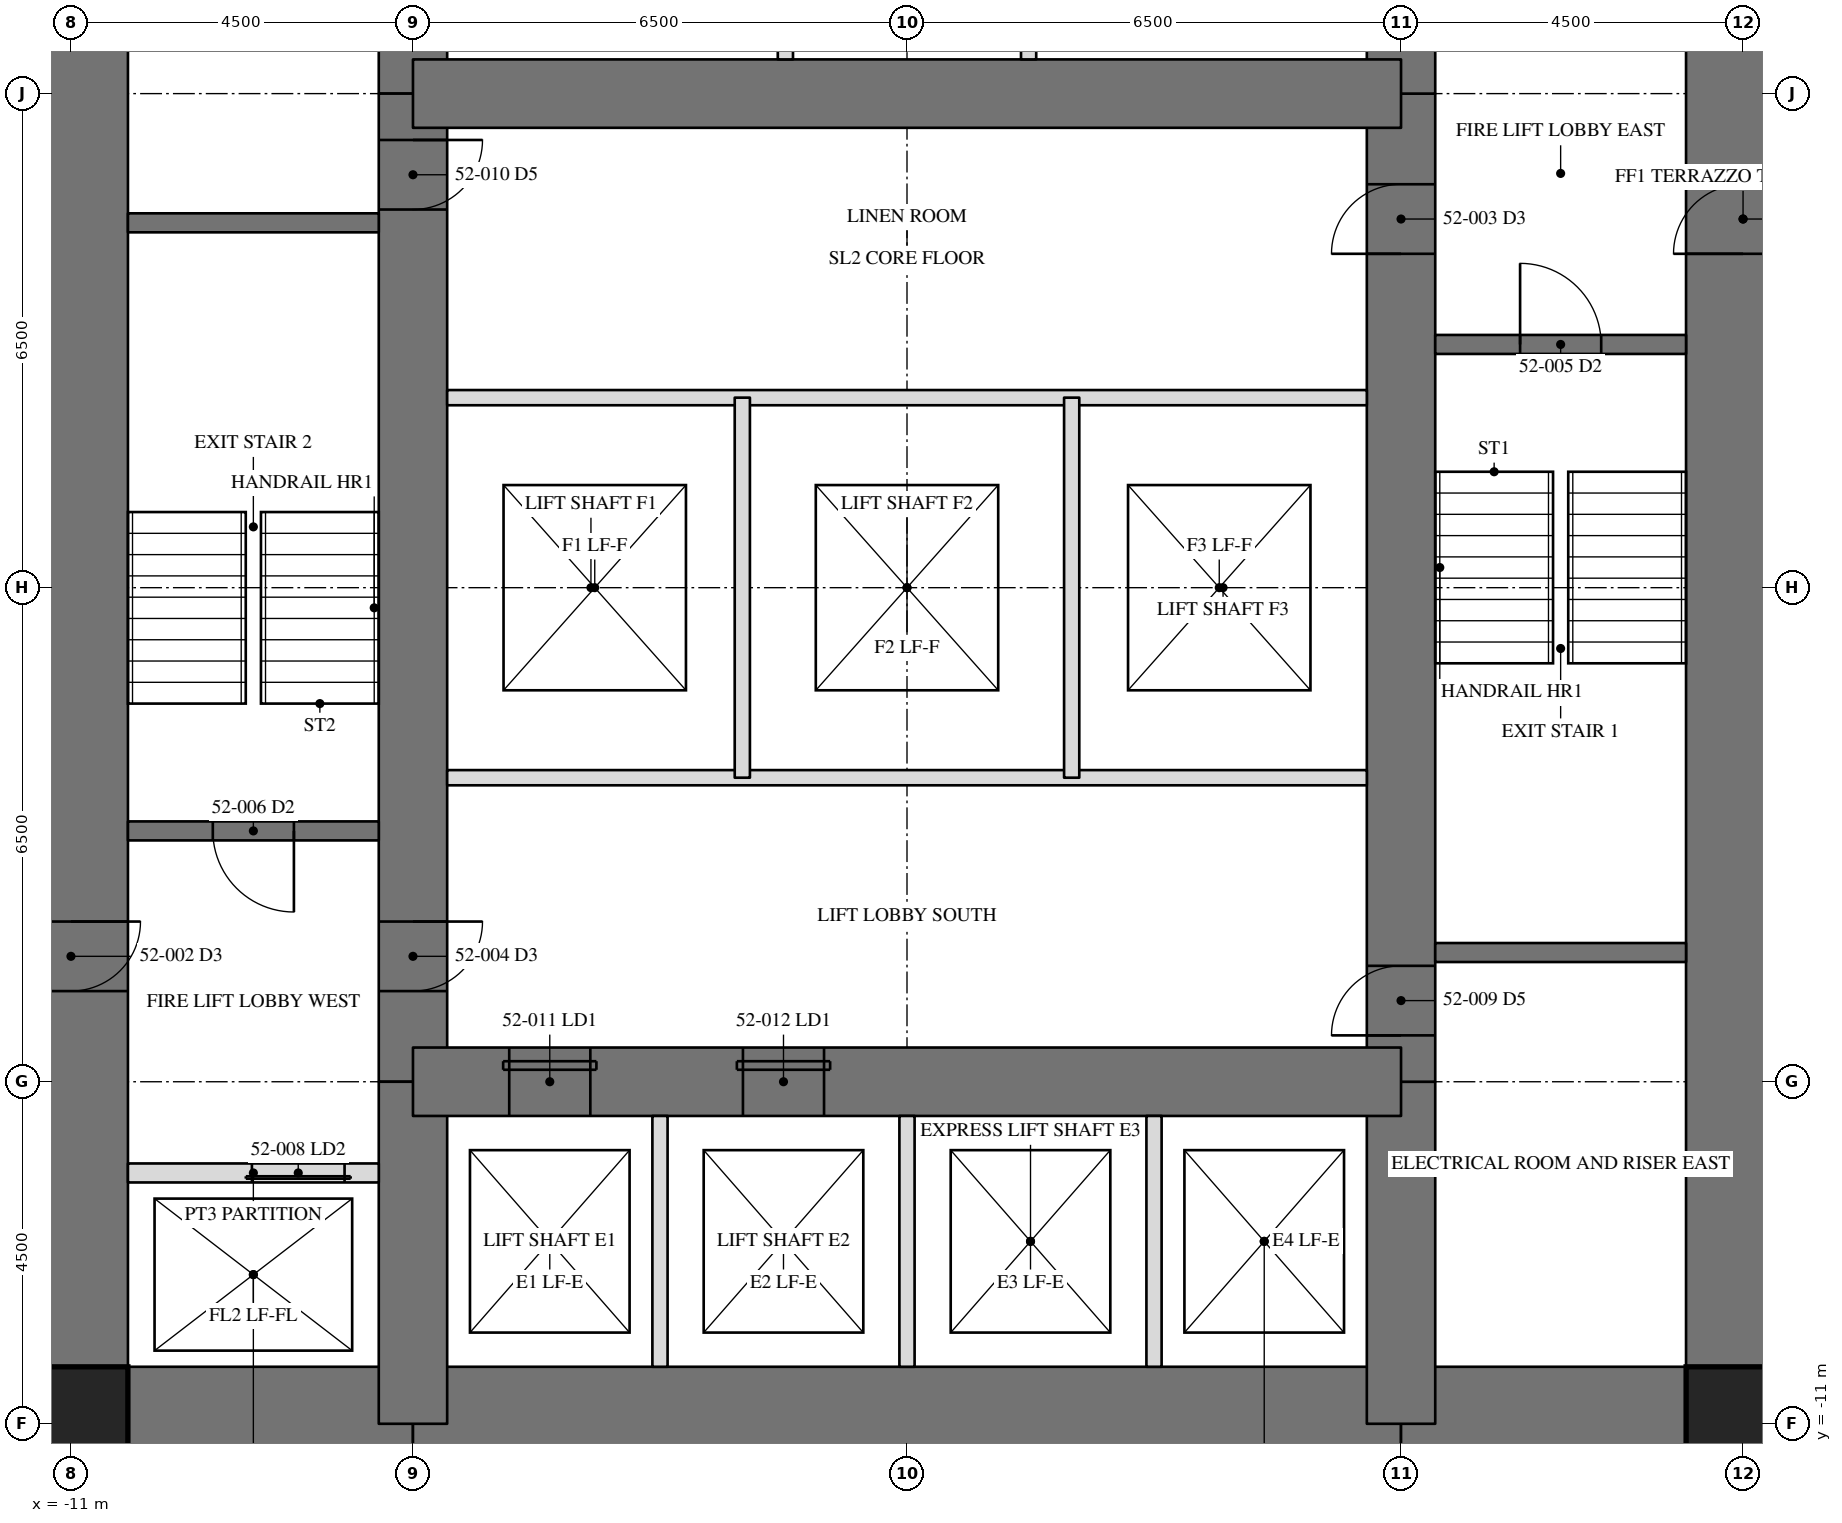
"""IFC4 building model, lengths in metres.
Left out: names, types, materials, properties, quantities, classifications, styles, units other than length and angle.
Written with IfcOpenShell. Run it as: python <this file> out.ifc"""

import sys

from ifc_helpers import new_model, si_unit, direction, frame, frame_2d, origin, origin_2d, place, context, subcontext, project, spatial, rectangle, hollow_rectangle, extrude, element, fill, save


model = new_model("IFC4")
c1 = context("Model", 3, precision=1e-05, world=origin(), true_north=direction((0.0, 1.0)))
c2 = subcontext(c1, "Body", "Model", "MODEL_VIEW")
j1 = project(units=[si_unit("LENGTHUNIT", "METRE"), si_unit("PLANEANGLEUNIT", "RADIAN")], contexts=[c1])
p1 = place(None, origin())
s1 = spatial("IfcSite", under=j1, at=p1, CompositionType="ELEMENT")
p2 = place(p1, origin())
s2 = spatial("IfcBuilding", under=s1, at=p2, CompositionType="ELEMENT")
p3 = place(p2, frame((0.0, 0.0, 218.7)))
s3 = spatial("IfcBuildingStorey", under=s2, at=p3, CompositionType="ELEMENT", Elevation=218.7)
p4 = place(p3, frame((11.0, -11.0, 0.0), z_axis=(0.0, 0.0, 1.0), x_axis=(0.0, 1.0, 0.0)))
e1 = element("IfcWall", 1, at=p4, inside=s3, PredefinedType="SHEAR", context=c2, shape_type="SweptSolid", body=[
    extrude(rectangle(XDim=22.0, YDim=1.5, at=frame_2d((11.0, 0.0))), origin(), (0.0, 0.0, 1.0), 3.5),
])
p5 = place(p4, frame((15.393, 0.0, 0.0)))
e2 = element("IfcOpeningElement", 2, at=p5, cuts=e1, PredefinedType="OPENING", context=c2, shape_type="SweptSolid", body=[
    extrude(rectangle(XDim=0.915, YDim=2.134, at=frame_2d((0.458, 1.067))), frame((0.0, 0.76, 0.0), z_axis=(0.0, -1.0, 0.0), x_axis=(1.0, 0.0, 0.0)), (0.0, 0.0, 1.0), 1.52),
])
p6 = place(p3, frame((-11.0, 11.0, 0.0), z_axis=(0.0, 0.0, 1.0), x_axis=(0.0, -1.0, 0.0)))
e3 = element("IfcWall", 3, at=p6, inside=s3, PredefinedType="SHEAR", context=c2, shape_type="SweptSolid", body=[
    extrude(rectangle(XDim=22.0, YDim=1.5, at=frame_2d((11.0, 0.0))), origin(), (0.0, 0.0, 1.0), 3.5),
])
p7 = place(p6, frame((15.393, 0.0, 0.0)))
e4 = element("IfcOpeningElement", 4, at=p7, cuts=e3, PredefinedType="OPENING", context=c2, shape_type="SweptSolid", body=[
    extrude(rectangle(XDim=0.915, YDim=2.134, at=frame_2d((0.458, 1.067))), frame((0.0, 0.76, 0.0), z_axis=(0.0, -1.0, 0.0), x_axis=(1.0, 0.0, 0.0)), (0.0, 0.0, 1.0), 1.52),
])
p8 = place(p3, frame((-11.0, -11.0, 0.0), z_axis=(0.0, 0.0, 1.0), x_axis=(1.0, 0.0, 0.0)))
e5 = element("IfcWall", 5, at=p8, inside=s3, PredefinedType="SHEAR", context=c2, shape_type="SweptSolid", body=[
    extrude(rectangle(XDim=4.5, YDim=1.5, at=frame_2d((2.25, 0.0))), origin(), (0.0, 0.0, 1.0), 3.5),
])
p9 = place(p3, frame((-6.5, -11.0, 0.0), z_axis=(0.0, 0.0, 1.0), x_axis=(1.0, 0.0, 0.0)))
e6 = element("IfcWall", 6, at=p9, inside=s3, PredefinedType="SHEAR", context=c2, shape_type="SweptSolid", body=[
    extrude(rectangle(XDim=13.0, YDim=1.5, at=frame_2d((6.5, 0.0))), origin(), (0.0, 0.0, 1.0), 3.5),
])
p10 = place(p3, frame((6.5, -11.0, 0.0), z_axis=(0.0, 0.0, 1.0), x_axis=(1.0, 0.0, 0.0)))
e7 = element("IfcWall", 7, at=p10, inside=s3, PredefinedType="SHEAR", context=c2, shape_type="SweptSolid", body=[
    extrude(rectangle(XDim=4.5, YDim=1.5, at=frame_2d((2.25, 0.0))), origin(), (0.0, 0.0, 1.0), 3.5),
])
p11 = place(p3, frame((6.5, -11.0, 0.0), z_axis=(0.0, 0.0, 1.0), x_axis=(0.0, 1.0, 0.0)))
e8 = element("IfcWall", 8, at=p11, inside=s3, PredefinedType="SHEAR", context=c2, shape_type="SweptSolid", body=[
    extrude(rectangle(XDim=4.5, YDim=0.9, at=frame_2d((2.25, 0.0))), origin(), (0.0, 0.0, 1.0), 3.5),
])
p12 = place(p3, frame((6.5, -6.5, 0.0), z_axis=(0.0, 0.0, 1.0), x_axis=(0.0, 1.0, 0.0)))
e9 = element("IfcWall", 9, at=p12, inside=s3, PredefinedType="SHEAR", context=c2, shape_type="SweptSolid", body=[
    extrude(rectangle(XDim=13.0, YDim=0.9, at=frame_2d((6.5, 0.0))), origin(), (0.0, 0.0, 1.0), 3.5),
])
p13 = place(p12, frame((10.893, 0.0, 0.0)))
e10 = element("IfcOpeningElement", 10, at=p13, cuts=e9, PredefinedType="OPENING", context=c2, shape_type="SweptSolid", body=[
    extrude(rectangle(XDim=0.915, YDim=2.134, at=frame_2d((0.458, 1.067))), frame((0.0, 0.46, 0.0), z_axis=(0.0, -1.0, 0.0), x_axis=(1.0, 0.0, 0.0)), (0.0, 0.0, 1.0), 0.92),
])
p14 = place(p12, frame((0.61, 0.0, 0.0)))
e11 = element("IfcOpeningElement", 11, at=p14, cuts=e9, PredefinedType="OPENING", context=c2, shape_type="SweptSolid", body=[
    extrude(rectangle(XDim=0.915, YDim=2.134, at=frame_2d((0.458, 1.067))), frame((0.0, 0.46, 0.0), z_axis=(0.0, -1.0, 0.0), x_axis=(1.0, 0.0, 0.0)), (0.0, 0.0, 1.0), 0.92),
])
for number, where, z_axis, x_axis in (
    (12, (6.5, 6.5, 0.0), (0.0, 0.0, 1.0), (0.0, 1.0, 0.0)),
    (13, (-6.5, 11.0, 0.0), (0.0, 0.0, 1.0), (0.0, -1.0, 0.0)),
):
    element("IfcWall", number, at=place(p3, frame(where, z_axis=z_axis, x_axis=x_axis)), inside=s3, PredefinedType="SHEAR", context=c2, shape_type="SweptSolid", body=[
        extrude(rectangle(XDim=4.5, YDim=0.9, at=frame_2d((2.25, 0.0))), origin(), (0.0, 0.0, 1.0), 3.5),
    ])
p15 = place(p3, frame((-6.5, 6.5, 0.0), z_axis=(0.0, 0.0, 1.0), x_axis=(0.0, -1.0, 0.0)))
e14 = element("IfcWall", 14, at=p15, inside=s3, PredefinedType="SHEAR", context=c2, shape_type="SweptSolid", body=[
    extrude(rectangle(XDim=13.0, YDim=0.9, at=frame_2d((6.5, 0.0))), origin(), (0.0, 0.0, 1.0), 3.5),
])
p16 = place(p15, frame((10.893, 0.0, 0.0)))
e15 = element("IfcOpeningElement", 15, at=p16, cuts=e14, PredefinedType="OPENING", context=c2, shape_type="SweptSolid", body=[
    extrude(rectangle(XDim=0.915, YDim=2.134, at=frame_2d((0.458, 1.067))), frame((0.0, 0.46, 0.0), z_axis=(0.0, -1.0, 0.0), x_axis=(1.0, 0.0, 0.0)), (0.0, 0.0, 1.0), 0.92),
])
p17 = place(p15, frame((0.61, 0.0, 0.0)))
e16 = element("IfcOpeningElement", 16, at=p17, cuts=e14, PredefinedType="OPENING", context=c2, shape_type="SweptSolid", body=[
    extrude(rectangle(XDim=0.915, YDim=2.134, at=frame_2d((0.458, 1.067))), frame((0.0, 0.46, 0.0), z_axis=(0.0, -1.0, 0.0), x_axis=(1.0, 0.0, 0.0)), (0.0, 0.0, 1.0), 0.92),
])
p18 = place(p3, frame((-6.5, -6.5, 0.0), z_axis=(0.0, 0.0, 1.0), x_axis=(0.0, -1.0, 0.0)))
e17 = element("IfcWall", 17, at=p18, inside=s3, PredefinedType="SHEAR", context=c2, shape_type="SweptSolid", body=[
    extrude(rectangle(XDim=4.5, YDim=0.9, at=frame_2d((2.25, 0.0))), origin(), (0.0, 0.0, 1.0), 3.5),
])
p19 = place(p3, frame((6.5, 6.5, 0.0), z_axis=(0.0, 0.0, 1.0), x_axis=(-1.0, 0.0, 0.0)))
e18 = element("IfcWall", 18, at=p19, inside=s3, PredefinedType="SHEAR", context=c2, shape_type="SweptSolid", body=[
    extrude(rectangle(XDim=13.0, YDim=0.9, at=frame_2d((6.5, 0.0))), origin(), (0.0, 0.0, 1.0), 3.5),
])
p20 = place(p3, frame((-6.5, -6.5, 0.0), z_axis=(0.0, 0.0, 1.0), x_axis=(1.0, 0.0, 0.0)))
e19 = element("IfcWall", 19, at=p20, inside=s3, PredefinedType="SHEAR", context=c2, shape_type="SweptSolid", body=[
    extrude(rectangle(XDim=13.0, YDim=0.9, at=frame_2d((6.5, 0.0))), origin(), (0.0, 0.0, 1.0), 3.5),
])
p21 = place(p20, frame((1.267, 0.0, 0.0)))
e20 = element("IfcOpeningElement", 20, at=p21, cuts=e19, PredefinedType="OPENING", context=c2, shape_type="SweptSolid", body=[
    extrude(rectangle(XDim=1.067, YDim=2.134, at=frame_2d((0.533, 1.067))), frame((0.0, 0.46, 0.0), z_axis=(0.0, -1.0, 0.0), x_axis=(1.0, 0.0, 0.0)), (0.0, 0.0, 1.0), 0.92),
])
p22 = place(p20, frame((4.342, 0.0, 0.0)))
e21 = element("IfcOpeningElement", 21, at=p22, cuts=e19, PredefinedType="OPENING", context=c2, shape_type="SweptSolid", body=[
    extrude(rectangle(XDim=1.067, YDim=2.134, at=frame_2d((0.533, 1.067))), frame((0.0, 0.46, 0.0), z_axis=(0.0, -1.0, 0.0), x_axis=(1.0, 0.0, 0.0)), (0.0, 0.0, 1.0), 0.92),
])
for number, where, z_axis, x_axis in (
    (22, (-11.0, -11.0, 0.0), (0.0, 0.0, 1.0), (1.0, 0.0, 0.0)),
    (23, (11.0, -11.0, 0.0), (0.0, 0.0, 1.0), (1.0, 0.0, 0.0)),
):
    element("IfcColumn", number, at=place(p3, frame(where, z_axis=z_axis, x_axis=x_axis)), inside=s3, PredefinedType="COLUMN", context=c2, shape_type="SweptSolid", body=[
        extrude(hollow_rectangle(XDim=1.499, YDim=1.499, WallThickness=0.102, at=origin_2d()), origin(), (0.0, 0.0, 1.0), 3.5),
    ])
for number, where, z_axis, x_axis in (
    (24, (6.95, -4.8, 0.0), (0.0, 0.0, 1.0), (1.0, 0.0, 0.0)),
    (25, (-6.95, 4.8, 0.0), (0.0, 0.0, 1.0), (-1.0, 0.0, 0.0)),
):
    element("IfcWall", number, at=place(p3, frame(where, z_axis=z_axis, x_axis=x_axis)), inside=s3, PredefinedType="SOLIDWALL", context=c2, shape_type="SweptSolid", body=[
        extrude(rectangle(XDim=3.3, YDim=0.25, at=frame_2d((1.65, 0.0))), origin(), (0.0, 0.0, 1.0), 3.31),
    ])
p23 = place(p3, frame((6.95, 3.2, 0.0), z_axis=(0.0, 0.0, 1.0), x_axis=(1.0, 0.0, 0.0)))
e26 = element("IfcWall", 26, at=p23, inside=s3, PredefinedType="SOLIDWALL", context=c2, shape_type="SweptSolid", body=[
    extrude(rectangle(XDim=3.3, YDim=0.25, at=frame_2d((1.65, 0.0))), origin(), (0.0, 0.0, 1.0), 3.31),
])
p24 = place(p23, frame((1.116, 0.0, 0.0)))
e27 = element("IfcOpeningElement", 27, at=p24, cuts=e26, PredefinedType="OPENING", context=c2, shape_type="SweptSolid", body=[
    extrude(rectangle(XDim=1.067, YDim=2.134, at=frame_2d((0.533, 1.067))), frame((0.0, 0.135, 0.0), z_axis=(0.0, -1.0, 0.0), x_axis=(1.0, 0.0, 0.0)), (0.0, 0.0, 1.0), 0.27),
])
p25 = place(p3, frame((-6.95, -3.2, 0.0), z_axis=(0.0, 0.0, 1.0), x_axis=(-1.0, 0.0, 0.0)))
e28 = element("IfcWall", 28, at=p25, inside=s3, PredefinedType="SOLIDWALL", context=c2, shape_type="SweptSolid", body=[
    extrude(rectangle(XDim=3.3, YDim=0.25, at=frame_2d((1.65, 0.0))), origin(), (0.0, 0.0, 1.0), 3.31),
])
p26 = place(p25, frame((1.116, 0.0, 0.0)))
e29 = element("IfcOpeningElement", 29, at=p26, cuts=e28, PredefinedType="OPENING", context=c2, shape_type="SweptSolid", body=[
    extrude(rectangle(XDim=1.067, YDim=2.134, at=frame_2d((0.533, 1.067))), frame((0.0, 0.135, 0.0), z_axis=(0.0, -1.0, 0.0), x_axis=(1.0, 0.0, 0.0)), (0.0, 0.0, 1.0), 0.27),
])
p27 = place(p3, frame((-6.95, -7.7, 0.0), z_axis=(0.0, 0.0, 1.0), x_axis=(-1.0, 0.0, 0.0)))
e30 = element("IfcWall", 30, at=p27, inside=s3, PredefinedType="PARTITIONING", context=c2, shape_type="SweptSolid", body=[
    extrude(rectangle(XDim=3.3, YDim=0.25, at=frame_2d((1.65, 0.0))), origin(), (0.0, 0.0, 1.0), 3.31),
])
p28 = place(p27, frame((0.45, 0.0, 0.0)))
e31 = element("IfcOpeningElement", 31, at=p28, cuts=e30, PredefinedType="OPENING", context=c2, shape_type="SweptSolid", body=[
    extrude(rectangle(XDim=1.219, YDim=2.134, at=frame_2d((0.609, 1.067))), frame((0.0, 0.135, 0.0), z_axis=(0.0, -1.0, 0.0), x_axis=(1.0, 0.0, 0.0)), (0.0, 0.0, 1.0), 0.27),
])
for number, where, z_axis, x_axis in (
    (32, (-6.05, 2.5, 0.0), (0.0, 0.0, 1.0), (1.0, 0.0, 0.0)),
    (33, (6.05, -2.5, 0.0), (0.0, 0.0, 1.0), (-1.0, 0.0, 0.0)),
):
    element("IfcWall", number, at=place(p3, frame(where, z_axis=z_axis, x_axis=x_axis)), inside=s3, PredefinedType="PARTITIONING", context=c2, shape_type="SweptSolid", body=[
        extrude(rectangle(XDim=12.1, YDim=0.2, at=frame_2d((6.05, 0.0))), origin(), (0.0, 0.0, 1.0), 3.31),
    ])
for number, where, z_axis, x_axis in (
    (34, (-3.25, -10.25, 0.0), (0.0, 0.0, 1.0), (0.0, 1.0, 0.0)),
    (35, (0.0, -10.25, 0.0), (0.0, 0.0, 1.0), (0.0, 1.0, 0.0)),
    (36, (3.25, -10.25, 0.0), (0.0, 0.0, 1.0), (0.0, 1.0, 0.0)),
):
    element("IfcWall", number, at=place(p3, frame(where, z_axis=z_axis, x_axis=x_axis)), inside=s3, PredefinedType="PARTITIONING", context=c2, shape_type="SweptSolid", body=[
        extrude(rectangle(XDim=3.3, YDim=0.2, at=frame_2d((1.65, 0.0))), origin(), (0.0, 0.0, 1.0), 3.31),
    ])
for number, where, z_axis, x_axis in (
    (37, (-2.167, -2.5, 0.0), (0.0, 0.0, 1.0), (0.0, 1.0, 0.0)),
    (38, (2.167, -2.5, 0.0), (0.0, 0.0, 1.0), (0.0, 1.0, 0.0)),
):
    element("IfcWall", number, at=place(p3, frame(where, z_axis=z_axis, x_axis=x_axis)), inside=s3, PredefinedType="PARTITIONING", context=c2, shape_type="SweptSolid", body=[
        extrude(rectangle(XDim=5.0, YDim=0.2, at=frame_2d((2.5, 0.0))), origin(), (0.0, 0.0, 1.0), 3.31),
    ])
p29 = place(p3, frame((-1.6, 6.95, 0.0), z_axis=(0.0, 0.0, 1.0), x_axis=(0.0, 1.0, 0.0)))
e39 = element("IfcWall", 39, at=p29, inside=s3, PredefinedType="PARTITIONING", context=c2, shape_type="SweptSolid", body=[
    extrude(rectangle(XDim=3.3, YDim=0.2, at=frame_2d((1.65, 0.0))), origin(), (0.0, 0.0, 1.0), 3.31),
])
p30 = place(p29, frame((1.192, 0.0, 0.0)))
e40 = element("IfcOpeningElement", 40, at=p30, cuts=e39, PredefinedType="OPENING", context=c2, shape_type="SweptSolid", body=[
    extrude(rectangle(XDim=0.915, YDim=2.134, at=frame_2d((0.458, 1.067))), frame((0.0, 0.11, 0.0), z_axis=(0.0, -1.0, 0.0), x_axis=(1.0, 0.0, 0.0)), (0.0, 0.0, 1.0), 0.22),
])
p31 = place(p3, frame((1.6, 6.95, 0.0), z_axis=(0.0, 0.0, 1.0), x_axis=(0.0, 1.0, 0.0)))
e41 = element("IfcWall", 41, at=p31, inside=s3, PredefinedType="PARTITIONING", context=c2, shape_type="SweptSolid", body=[
    extrude(rectangle(XDim=3.3, YDim=0.2, at=frame_2d((1.65, 0.0))), origin(), (0.0, 0.0, 1.0), 3.31),
])
p32 = place(p31, frame((1.192, 0.0, 0.0)))
e42 = element("IfcOpeningElement", 42, at=p32, cuts=e41, PredefinedType="OPENING", context=c2, shape_type="SweptSolid", body=[
    extrude(rectangle(XDim=0.915, YDim=2.134, at=frame_2d((0.458, 1.067))), frame((0.0, 0.11, 0.0), z_axis=(0.0, -1.0, 0.0), x_axis=(1.0, 0.0, 0.0)), (0.0, 0.0, 1.0), 0.22),
])
p33 = place(p13, origin())
e43 = element("IfcDoor", 43, at=p33, inside=s3, OperationType="SINGLE_SWING_RIGHT", PredefinedType="DOOR", context=c2, shape_type="SweptSolid", body=[
    extrude(rectangle(XDim=0.915, YDim=2.134, at=frame_2d((0.458, 1.067))), frame((0.0, -0.375, 0.0), z_axis=(0.0, -1.0, 0.0), x_axis=(1.0, 0.0, 0.0)), (0.0, 0.0, 1.0), 0.05),
])
fill(e10, e43)
p34 = place(p16, origin())
e44 = element("IfcDoor", 44, at=p34, inside=s3, OperationType="SINGLE_SWING_RIGHT", PredefinedType="DOOR", context=c2, shape_type="SweptSolid", body=[
    extrude(rectangle(XDim=0.915, YDim=2.134, at=frame_2d((0.458, 1.067))), frame((0.0, -0.375, 0.0), z_axis=(0.0, -1.0, 0.0), x_axis=(1.0, 0.0, 0.0)), (0.0, 0.0, 1.0), 0.05),
])
fill(e15, e44)
p35 = place(p24, origin())
e45 = element("IfcDoor", 45, at=p35, inside=s3, OperationType="SINGLE_SWING_LEFT", PredefinedType="DOOR", context=c2, shape_type="SweptSolid", body=[
    extrude(rectangle(XDim=1.067, YDim=2.134, at=frame_2d((0.533, 1.067))), frame((0.0, 0.025, 0.0), z_axis=(0.0, -1.0, 0.0), x_axis=(1.0, 0.0, 0.0)), (0.0, 0.0, 1.0), 0.05),
])
fill(e27, e45)
p36 = place(p26, origin())
e46 = element("IfcDoor", 46, at=p36, inside=s3, OperationType="SINGLE_SWING_LEFT", PredefinedType="DOOR", context=c2, shape_type="SweptSolid", body=[
    extrude(rectangle(XDim=1.067, YDim=2.134, at=frame_2d((0.533, 1.067))), frame((0.0, 0.025, 0.0), z_axis=(0.0, -1.0, 0.0), x_axis=(1.0, 0.0, 0.0)), (0.0, 0.0, 1.0), 0.05),
])
fill(e29, e46)
p37 = place(p28, origin())
e47 = element("IfcDoor", 47, at=p37, inside=s3, OperationType="SLIDING_TO_LEFT", PredefinedType="DOOR", context=c2, shape_type="SweptSolid", body=[
    extrude(rectangle(XDim=1.219, YDim=2.134, at=frame_2d((0.609, 1.067))), frame((0.0, 0.025, 0.0), z_axis=(0.0, -1.0, 0.0), x_axis=(1.0, 0.0, 0.0)), (0.0, 0.0, 1.0), 0.05),
])
fill(e31, e47)
p38 = place(p14, origin())
e48 = element("IfcDoor", 48, at=p38, inside=s3, OperationType="SINGLE_SWING_RIGHT", PredefinedType="DOOR", context=c2, shape_type="SweptSolid", body=[
    extrude(rectangle(XDim=0.915, YDim=2.134, at=frame_2d((0.458, 1.067))), frame((0.0, -0.375, 0.0), z_axis=(0.0, -1.0, 0.0), x_axis=(1.0, 0.0, 0.0)), (0.0, 0.0, 1.0), 0.05),
])
fill(e11, e48)
p39 = place(p17, origin())
e49 = element("IfcDoor", 49, at=p39, inside=s3, OperationType="SINGLE_SWING_RIGHT", PredefinedType="DOOR", context=c2, shape_type="SweptSolid", body=[
    extrude(rectangle(XDim=0.915, YDim=2.134, at=frame_2d((0.458, 1.067))), frame((0.0, -0.375, 0.0), z_axis=(0.0, -1.0, 0.0), x_axis=(1.0, 0.0, 0.0)), (0.0, 0.0, 1.0), 0.05),
])
fill(e16, e49)
p40 = place(p21, origin())
e50 = element("IfcDoor", 50, at=p40, inside=s3, OperationType="SLIDING_TO_LEFT", PredefinedType="DOOR", context=c2, shape_type="SweptSolid", body=[
    extrude(rectangle(XDim=1.067, YDim=2.134, at=frame_2d((0.533, 1.067))), frame((0.0, -0.375, 0.0), z_axis=(0.0, -1.0, 0.0), x_axis=(1.0, 0.0, 0.0)), (0.0, 0.0, 1.0), 0.05),
])
fill(e20, e50)
p41 = place(p22, origin())
e51 = element("IfcDoor", 51, at=p41, inside=s3, OperationType="SLIDING_TO_LEFT", PredefinedType="DOOR", context=c2, shape_type="SweptSolid", body=[
    extrude(rectangle(XDim=1.067, YDim=2.134, at=frame_2d((0.533, 1.067))), frame((0.0, -0.375, 0.0), z_axis=(0.0, -1.0, 0.0), x_axis=(1.0, 0.0, 0.0)), (0.0, 0.0, 1.0), 0.05),
])
fill(e21, e51)
save(model, sys.argv[1])
